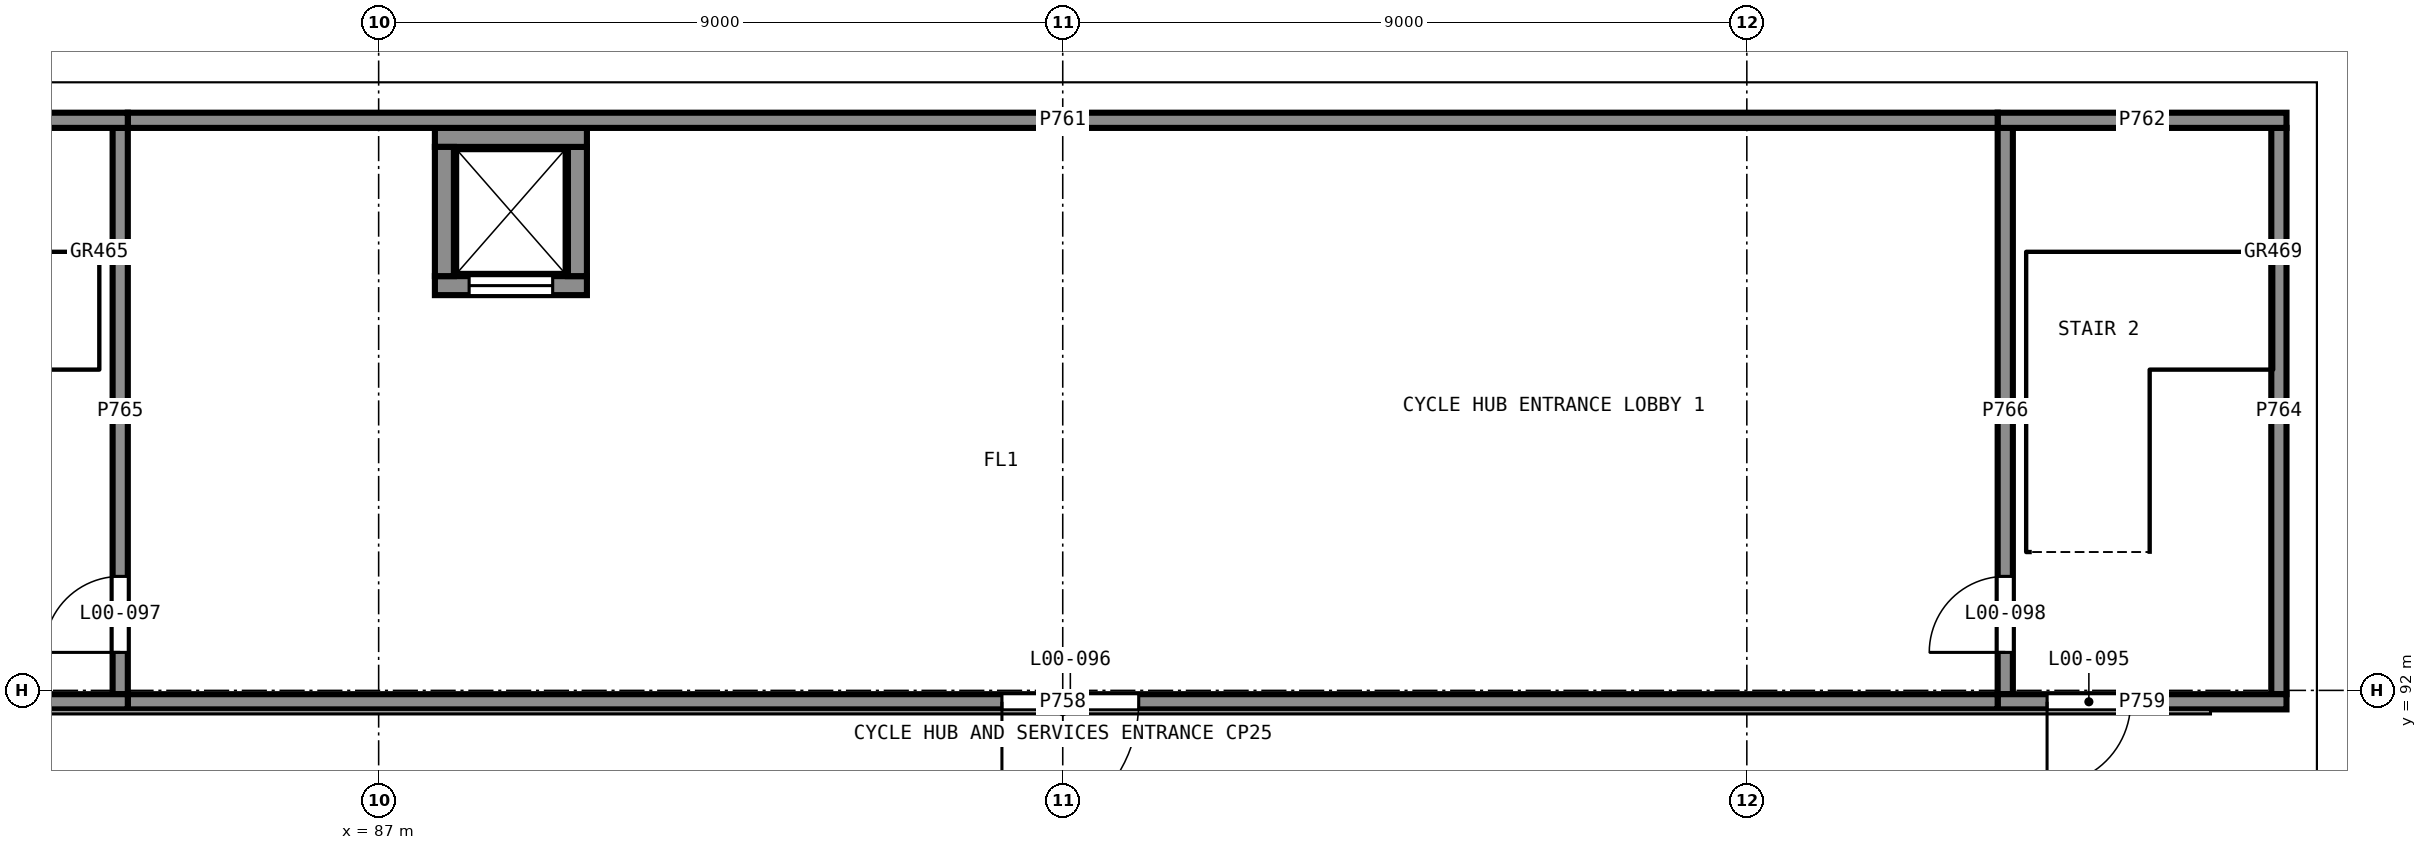
"""IFC4 building model, lengths in metres.
Left out: names, types, materials, properties, quantities, classifications, styles, units other than length and angle.
Written with IfcOpenShell. Run it as: python <this file> out.ifc"""

import sys

from ifc_helpers import new_model, si_unit, direction, frame, frame_2d, origin, place, context, subcontext, project, spatial, rectangle, extrude, element, fill, save


model = new_model("IFC4")
c1 = context("Model", 3, precision=1e-05, world=origin(), true_north=direction((0.0, 1.0)))
c2 = subcontext(c1, "Body", "Model", "MODEL_VIEW")
j1 = project(units=[si_unit("LENGTHUNIT", "METRE"), si_unit("PLANEANGLEUNIT", "RADIAN")], contexts=[c1])
p1 = place(None, origin())
s1 = spatial("IfcSite", under=j1, at=p1, CompositionType="ELEMENT")
p2 = place(p1, origin())
s2 = spatial("IfcBuilding", under=s1, at=p2, CompositionType="ELEMENT")
p3 = place(p2, origin())
s3 = spatial("IfcBuildingStorey", under=s2, at=p3, CompositionType="ELEMENT", Elevation=0.0)
p4 = place(p3, frame((87.74, 97.325, 0.0), z_axis=(0.0, 0.0, 1.0), x_axis=(1.0, 0.0, 0.0)))
e1 = element("IfcWall", 1, at=p4, inside=s3, PredefinedType="SHEAR", context=c2, shape_type="SweptSolid", body=[
    extrude(rectangle(XDim=2.0, YDim=0.25, at=frame_2d((1.0, 0.0))), origin(), (0.0, 0.0, 1.0), 3.8),
])
p5 = place(p4, frame((0.45, 0.0, 0.0)))
e2 = element("IfcOpeningElement", 2, at=p5, cuts=e1, PredefinedType="OPENING", context=c2, shape_type="SweptSolid", body=[
    extrude(rectangle(XDim=1.1, YDim=2.1, at=frame_2d((0.55, 1.05))), frame((0.0, 0.135, 0.0), z_axis=(0.0, -1.0, 0.0), x_axis=(1.0, 0.0, 0.0)), (0.0, 0.0, 1.0), 0.27),
])
p6 = place(p3, frame((89.615, 97.45, 0.0), z_axis=(0.0, 0.0, 1.0), x_axis=(0.0, 1.0, 0.0)))
e3 = element("IfcWall", 3, at=p6, inside=s3, PredefinedType="SHEAR", context=c2, shape_type="SweptSolid", body=[
    extrude(rectangle(XDim=1.7, YDim=0.25, at=frame_2d((0.85, 0.0))), origin(), (0.0, 0.0, 1.0), 3.8),
])
p7 = place(p3, frame((89.74, 99.275, 0.0), z_axis=(0.0, 0.0, 1.0), x_axis=(-1.0, 0.0, 0.0)))
e4 = element("IfcWall", 4, at=p7, inside=s3, PredefinedType="SHEAR", context=c2, shape_type="SweptSolid", body=[
    extrude(rectangle(XDim=2.0, YDim=0.25, at=frame_2d((1.0, 0.0))), origin(), (0.0, 0.0, 1.0), 3.8),
])
p8 = place(p3, frame((87.865, 99.15, 0.0), z_axis=(0.0, 0.0, 1.0), x_axis=(0.0, -1.0, 0.0)))
e5 = element("IfcWall", 5, at=p8, inside=s3, PredefinedType="SHEAR", context=c2, shape_type="SweptSolid", body=[
    extrude(rectangle(XDim=1.7, YDim=0.25, at=frame_2d((0.85, 0.0))), origin(), (0.0, 0.0, 1.0), 3.8),
])
p9 = place(p3, frame((79.9, 91.85, -0.15), z_axis=(0.0, 0.0, 1.0), x_axis=(1.0, 0.0, 0.0)))
e6 = element("IfcWall", 6, at=p9, inside=s3, PredefinedType="SOLIDWALL", context=c2, shape_type="SweptSolid", body=[
    extrude(rectangle(XDim=3.8, YDim=0.2, at=frame_2d((1.9, 0.0))), origin(), (0.0, 0.0, 1.0), 3.95),
])
p10 = place(p9, frame((0.55, 0.0, 0.15)))
e7 = element("IfcOpeningElement", 7, at=p10, cuts=e6, PredefinedType="OPENING", context=c2, shape_type="SweptSolid", body=[
    extrude(rectangle(XDim=1.1, YDim=2.1, at=frame_2d((0.55, 1.05))), frame((0.0, 0.11, 0.0), z_axis=(0.0, -1.0, 0.0), x_axis=(1.0, 0.0, 0.0)), (0.0, 0.0, 1.0), 0.22),
])
p11 = place(p3, frame((83.7, 91.85, -0.15), z_axis=(0.0, 0.0, 1.0), x_axis=(1.0, 0.0, 0.0)))
e8 = element("IfcWall", 8, at=p11, inside=s3, PredefinedType="SOLIDWALL", context=c2, shape_type="SweptSolid", body=[
    extrude(rectangle(XDim=24.6, YDim=0.2, at=frame_2d((12.3, 0.0))), origin(), (0.0, 0.0, 1.0), 3.95),
])
p12 = place(p11, frame((11.5, 0.0, 0.15)))
e9 = element("IfcOpeningElement", 9, at=p12, cuts=e8, PredefinedType="OPENING", context=c2, shape_type="SweptSolid", body=[
    extrude(rectangle(XDim=1.8, YDim=2.1, at=frame_2d((0.9, 1.05))), frame((0.0, 0.11, 0.0), z_axis=(0.0, -1.0, 0.0), x_axis=(1.0, 0.0, 0.0)), (0.0, 0.0, 1.0), 0.22),
])
p13 = place(p3, frame((108.3, 91.85, -0.15), z_axis=(0.0, 0.0, 1.0), x_axis=(1.0, 0.0, 0.0)))
e10 = element("IfcWall", 10, at=p13, inside=s3, PredefinedType="SOLIDWALL", context=c2, shape_type="SweptSolid", body=[
    extrude(rectangle(XDim=3.8, YDim=0.2, at=frame_2d((1.9, 0.0))), origin(), (0.0, 0.0, 1.0), 3.95),
])
p14 = place(p13, frame((0.65, 0.0, 0.15)))
e11 = element("IfcOpeningElement", 11, at=p14, cuts=e10, PredefinedType="OPENING", context=c2, shape_type="SweptSolid", body=[
    extrude(rectangle(XDim=1.1, YDim=2.1, at=frame_2d((0.55, 1.05))), frame((0.0, 0.11, 0.0), z_axis=(0.0, -1.0, 0.0), x_axis=(1.0, 0.0, 0.0)), (0.0, 0.0, 1.0), 0.22),
])
p15 = place(p3, frame((79.9, 99.5, -0.15), z_axis=(0.0, 0.0, 1.0), x_axis=(1.0, 0.0, 0.0)))
e12 = element("IfcWall", 12, at=p15, inside=s3, PredefinedType="SOLIDWALL", context=c2, shape_type="SweptSolid", body=[
    extrude(rectangle(XDim=3.8, YDim=0.2, at=frame_2d((1.9, 0.0))), origin(), (0.0, 0.0, 1.0), 3.95),
])
p16 = place(p3, frame((83.7, 99.5, -0.15), z_axis=(0.0, 0.0, 1.0), x_axis=(1.0, 0.0, 0.0)))
e13 = element("IfcWall", 13, at=p16, inside=s3, PredefinedType="SOLIDWALL", context=c2, shape_type="SweptSolid", body=[
    extrude(rectangle(XDim=24.6, YDim=0.2, at=frame_2d((12.3, 0.0))), origin(), (0.0, 0.0, 1.0), 3.95),
])
p17 = place(p3, frame((108.3, 99.5, -0.15), z_axis=(0.0, 0.0, 1.0), x_axis=(1.0, 0.0, 0.0)))
e14 = element("IfcWall", 14, at=p17, inside=s3, PredefinedType="SOLIDWALL", context=c2, shape_type="SweptSolid", body=[
    extrude(rectangle(XDim=3.8, YDim=0.2, at=frame_2d((1.9, 0.0))), origin(), (0.0, 0.0, 1.0), 3.95),
])
p18 = place(p3, frame((112.0, 91.95, -0.15), z_axis=(0.0, 0.0, 1.0), x_axis=(0.0, 1.0, 0.0)))
e15 = element("IfcWall", 15, at=p18, inside=s3, PredefinedType="SOLIDWALL", context=c2, shape_type="SweptSolid", body=[
    extrude(rectangle(XDim=7.45, YDim=0.2, at=frame_2d((3.725, 0.0))), origin(), (0.0, 0.0, 1.0), 3.95),
])
p19 = place(p3, frame((83.6, 91.95, -0.15), z_axis=(0.0, 0.0, 1.0), x_axis=(0.0, 1.0, 0.0)))
e16 = element("IfcWall", 16, at=p19, inside=s3, PredefinedType="SOLIDWALL", context=c2, shape_type="SweptSolid", body=[
    extrude(rectangle(XDim=7.45, YDim=0.2, at=frame_2d((3.725, 0.0))), origin(), (0.0, 0.0, 1.0), 3.95),
])
p20 = place(p19, frame((0.55, 0.0, 0.15)))
e17 = element("IfcOpeningElement", 17, at=p20, cuts=e16, PredefinedType="OPENING", context=c2, shape_type="SweptSolid", body=[
    extrude(rectangle(XDim=1.0, YDim=2.1, at=frame_2d((0.5, 1.05))), frame((0.0, 0.11, 0.0), z_axis=(0.0, -1.0, 0.0), x_axis=(1.0, 0.0, 0.0)), (0.0, 0.0, 1.0), 0.22),
])
p21 = place(p3, frame((108.4, 91.95, -0.15), z_axis=(0.0, 0.0, 1.0), x_axis=(0.0, 1.0, 0.0)))
e18 = element("IfcWall", 18, at=p21, inside=s3, PredefinedType="SOLIDWALL", context=c2, shape_type="SweptSolid", body=[
    extrude(rectangle(XDim=7.45, YDim=0.2, at=frame_2d((3.725, 0.0))), origin(), (0.0, 0.0, 1.0), 3.95),
])
p22 = place(p21, frame((0.55, 0.0, 0.15)))
e19 = element("IfcOpeningElement", 19, at=p22, cuts=e18, PredefinedType="OPENING", context=c2, shape_type="SweptSolid", body=[
    extrude(rectangle(XDim=1.0, YDim=2.1, at=frame_2d((0.5, 1.05))), frame((0.0, 0.11, 0.0), z_axis=(0.0, -1.0, 0.0), x_axis=(1.0, 0.0, 0.0)), (0.0, 0.0, 1.0), 0.22),
])
p23 = place(p5, origin())
e20 = element("IfcDoor", 20, at=p23, inside=s3, OperationType="SLIDING_TO_LEFT", PredefinedType="DOOR", context=c2, shape_type="SweptSolid", body=[
    extrude(rectangle(XDim=1.1, YDim=2.1, at=frame_2d((0.55, 1.05))), frame((0.0, 0.025, 0.0), z_axis=(0.0, -1.0, 0.0), x_axis=(1.0, 0.0, 0.0)), (0.0, 0.0, 1.0), 0.05),
])
fill(e2, e20)
p24 = place(p14, frame((1.1, 0.0, 0.0), z_axis=(0.0, 0.0, 1.0), x_axis=(-1.0, 0.0, 0.0)))
e21 = element("IfcDoor", 21, at=p24, inside=s3, OperationType="SINGLE_SWING_LEFT", PredefinedType="DOOR", context=c2, shape_type="SweptSolid", body=[
    extrude(rectangle(XDim=1.1, YDim=2.1, at=frame_2d((0.55, 1.05))), frame((0.0, 0.025, 0.0), z_axis=(0.0, -1.0, 0.0), x_axis=(1.0, 0.0, 0.0)), (0.0, 0.0, 1.0), 0.05),
])
fill(e11, e21)
p25 = place(p12, frame((1.8, 0.0, 0.0), z_axis=(0.0, 0.0, 1.0), x_axis=(-1.0, 0.0, 0.0)))
e22 = element("IfcDoor", 22, at=p25, inside=s3, OperationType="DOUBLE_DOOR_SINGLE_SWING", PredefinedType="DOOR", context=c2, shape_type="SweptSolid", body=[
    extrude(rectangle(XDim=1.8, YDim=2.1, at=frame_2d((0.9, 1.05))), frame((0.0, 0.025, 0.0), z_axis=(0.0, -1.0, 0.0), x_axis=(1.0, 0.0, 0.0)), (0.0, 0.0, 1.0), 0.05),
])
fill(e9, e22)
p26 = place(p20, origin())
e23 = element("IfcDoor", 23, at=p26, inside=s3, OperationType="SINGLE_SWING_RIGHT", PredefinedType="DOOR", context=c2, shape_type="SweptSolid", body=[
    extrude(rectangle(XDim=1.0, YDim=2.1, at=frame_2d((0.5, 1.05))), frame((0.0, 0.025, 0.0), z_axis=(0.0, -1.0, 0.0), x_axis=(1.0, 0.0, 0.0)), (0.0, 0.0, 1.0), 0.05),
])
fill(e17, e23)
p27 = place(p22, origin())
e24 = element("IfcDoor", 24, at=p27, inside=s3, OperationType="SINGLE_SWING_RIGHT", PredefinedType="DOOR", context=c2, shape_type="SweptSolid", body=[
    extrude(rectangle(XDim=1.0, YDim=2.1, at=frame_2d((0.5, 1.05))), frame((0.0, 0.025, 0.0), z_axis=(0.0, -1.0, 0.0), x_axis=(1.0, 0.0, 0.0)), (0.0, 0.0, 1.0), 0.05),
])
fill(e19, e24)
save(model, sys.argv[1])
